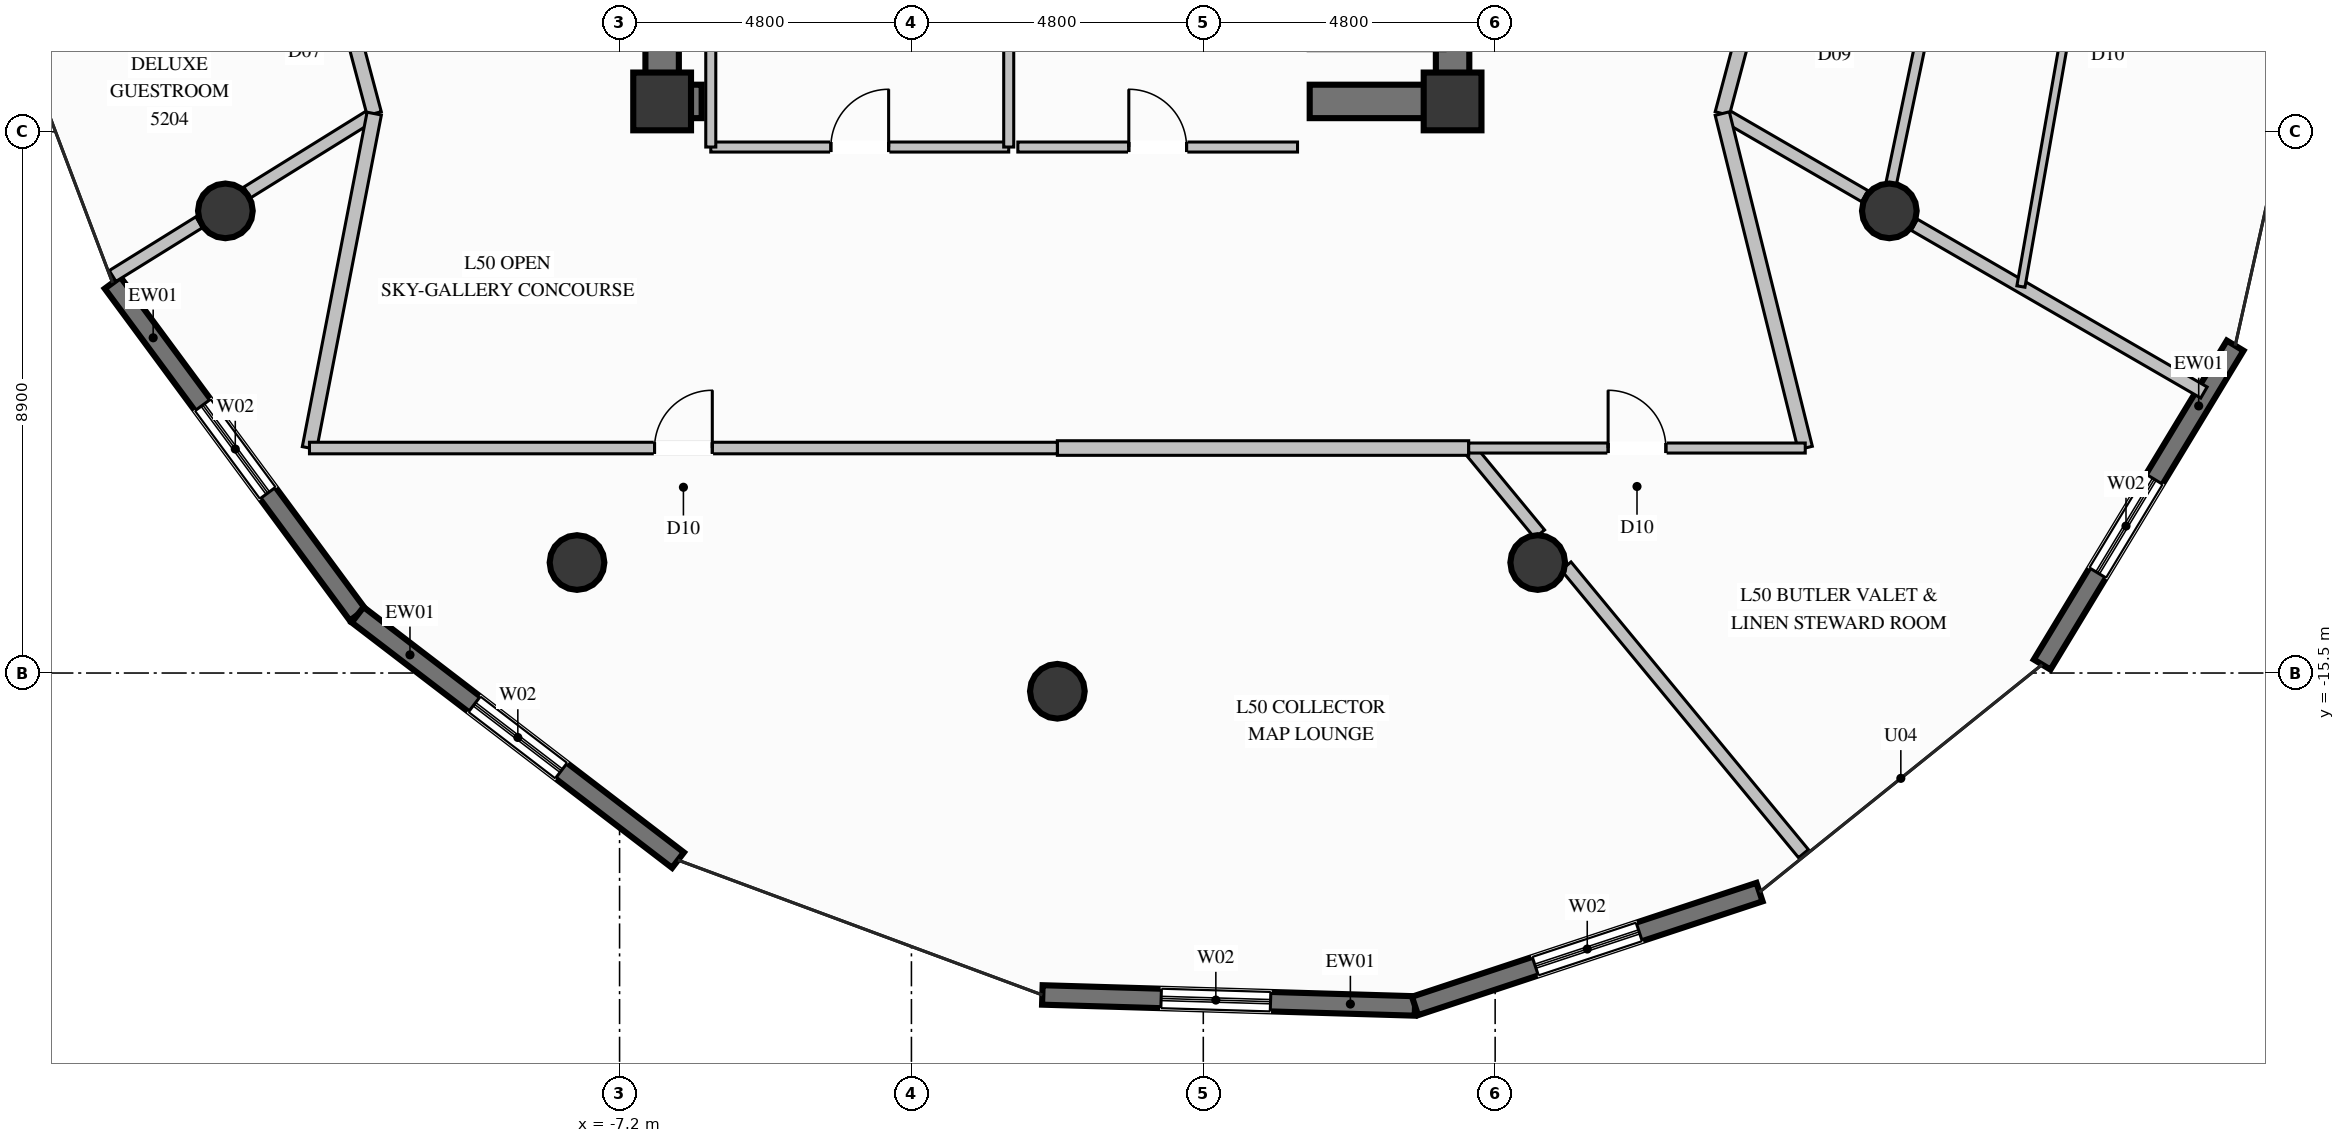
"""IFC4 building model, lengths in metres.
Left out: names, types, materials, properties, quantities, classifications, styles, units other than length and angle.
Written with IfcOpenShell. Run it as: python <this file> out.ifc"""

import sys

from ifc_helpers import new_model, si_unit, direction, frame, frame_2d, origin, origin_2d, place, context, subcontext, project, spatial, rectangle, circle, extrude, element, fill, save


model = new_model("IFC4")
c1 = context("Model", 3, precision=1e-05, world=origin(), true_north=direction((0.0, 1.0)))
c2 = subcontext(c1, "Body", "Model", "MODEL_VIEW")
j1 = project(units=[si_unit("LENGTHUNIT", "METRE"), si_unit("PLANEANGLEUNIT", "RADIAN")], contexts=[c1])
p1 = place(None, origin())
s1 = spatial("IfcSite", under=j1, at=p1, CompositionType="ELEMENT")
p2 = place(p1, origin())
s2 = spatial("IfcBuilding", under=s1, at=p2, CompositionType="ELEMENT")
p3 = place(p2, frame((0.0, 0.0, 194.8)))
s3 = spatial("IfcBuildingStorey", under=s2, at=p3, CompositionType="ELEMENT", Elevation=194.8)
for number, where, z_axis, x_axis in (
    (1, (-6.5, -6.1, 0.0), (0.0, 0.0, 1.0), (1.0, 0.0, 0.0)),
    (2, (6.5, -6.1, 0.0), (0.0, 0.0, 1.0), (1.0, 0.0, 0.0)),
):
    element("IfcColumn", number, at=place(p3, frame(where, z_axis=z_axis, x_axis=x_axis)), inside=s3, PredefinedType="COLUMN", context=c2, shape_type="SweptSolid", body=[
        extrude(rectangle(XDim=0.95, YDim=0.95, at=origin_2d()), origin(), (0.0, 0.0, 1.0), 3.6),
    ])
p4 = place(p3, frame((-6.225, -6.1, 0.0), z_axis=(0.0, 0.0, 1.0), x_axis=(1.0, 0.0, 0.0)))
e3 = element("IfcWall", 3, at=p4, inside=s3, PredefinedType="SHEAR", context=c2, shape_type="SweptSolid", body=[
    extrude(rectangle(XDim=0.375, YDim=0.55, at=frame_2d((0.188, 0.0))), origin(), (0.0, 0.0, 1.0), 3.6),
])
p5 = place(p3, frame((4.15, -6.1, 0.0), z_axis=(0.0, 0.0, 1.0), x_axis=(1.0, 0.0, 0.0)))
e4 = element("IfcWall", 4, at=p5, inside=s3, PredefinedType="SHEAR", context=c2, shape_type="SweptSolid", body=[
    extrude(rectangle(XDim=2.075, YDim=0.55, at=frame_2d((1.038, 0.0))), origin(), (0.0, 0.0, 1.0), 3.6),
])
p6 = place(p3, frame((-6.5, -6.375, 0.0), z_axis=(0.0, 0.0, 1.0), x_axis=(0.0, 1.0, 0.0)))
e5 = element("IfcWall", 5, at=p6, inside=s3, PredefinedType="SHEAR", context=c2, shape_type="SweptSolid", body=[
    extrude(rectangle(XDim=3.025, YDim=0.55, at=frame_2d((1.512, 0.0))), origin(), (0.0, 0.0, 1.0), 3.6),
])
p7 = place(p3, frame((6.5, -6.375, 0.0), z_axis=(0.0, 0.0, 1.0), x_axis=(0.0, 1.0, 0.0)))
e6 = element("IfcWall", 6, at=p7, inside=s3, PredefinedType="SHEAR", context=c2, shape_type="SweptSolid", body=[
    extrude(rectangle(XDim=4.025, YDim=0.55, at=frame_2d((2.012, 0.0))), origin(), (0.0, 0.0, 1.0), 3.6),
])
for number, where, z_axis, x_axis in (
    (7, (-13.683, -7.9, 0.0), (0.0, 0.0, 1.0), (1.0, 0.0, 0.0)),
    (8, (-7.9, -13.683, 0.0), (0.0, 0.0, 1.0), (1.0, 0.0, 0.0)),
    (9, (0.0, -15.8, 0.0), (0.0, 0.0, 1.0), (1.0, 0.0, 0.0)),
    (10, (7.9, -13.683, 0.0), (0.0, 0.0, 1.0), (1.0, 0.0, 0.0)),
    (11, (13.683, -7.9, 0.0), (0.0, 0.0, 1.0), (1.0, 0.0, 0.0)),
):
    element("IfcColumn", number, at=place(p3, frame(where, z_axis=z_axis, x_axis=x_axis)), inside=s3, PredefinedType="COLUMN", context=c2, shape_type="SweptSolid", body=[
        extrude(circle(Radius=0.45, at=origin_2d()), origin(), (0.0, 0.0, 1.0), 3.6),
    ])
p8 = place(p3, frame((19.371, -10.116, 0.0), z_axis=(0.0, 0.0, 1.0), x_axis=(-0.517847159829, -0.855473155077, 0.0)))
e12 = element("IfcWall", 12, at=p8, inside=s3, PredefinedType="SOLIDWALL", context=c2, shape_type="SweptSolid", body=[
    extrude(rectangle(XDim=6.131, YDim=0.32, at=frame_2d((3.066, 0.0))), origin(), (0.0, 0.0, 1.0), 3.36),
])
p9 = place(p8, frame((2.568, 0.0, 0.35)))
e13 = element("IfcOpeningElement", 13, at=p9, cuts=e12, PredefinedType="OPENING", context=c2, shape_type="SweptSolid", body=[
    extrude(rectangle(XDim=1.8, YDim=2.6, at=frame_2d((0.9, 1.3))), frame((0.0, 0.17, 0.0), z_axis=(0.0, -1.0, 0.0), x_axis=(1.0, 0.0, 0.0)), (0.0, 0.0, 1.0), 0.34),
])
p10 = place(p3, frame((-11.508, -14.542, 0.0), z_axis=(0.0, 0.0, 1.0), x_axis=(-0.593926605151, 0.804519227672, 0.0)))
e14 = element("IfcWall", 14, at=p10, inside=s3, PredefinedType="SOLIDWALL", context=c2, shape_type="SweptSolid", body=[
    extrude(rectangle(XDim=6.785, YDim=0.32, at=frame_2d((3.393, 0.0))), origin(), (0.0, 0.0, 1.0), 3.36),
])
p11 = place(p10, frame((2.488, 0.0, 0.35)))
e15 = element("IfcOpeningElement", 15, at=p11, cuts=e14, PredefinedType="OPENING", context=c2, shape_type="SweptSolid", body=[
    extrude(rectangle(XDim=1.8, YDim=2.6, at=frame_2d((0.9, 1.3))), frame((0.0, 0.17, 0.0), z_axis=(0.0, -1.0, 0.0), x_axis=(1.0, 0.0, 0.0)), (0.0, 0.0, 1.0), 0.34),
])
p12 = place(p3, frame((-6.239, -18.577, 0.0), z_axis=(0.0, 0.0, 1.0), x_axis=(-0.793947286628, 0.607986600227, 0.0)))
e16 = element("IfcWall", 16, at=p12, inside=s3, PredefinedType="SOLIDWALL", context=c2, shape_type="SweptSolid", body=[
    extrude(rectangle(XDim=6.636, YDim=0.32, at=frame_2d((3.318, 0.0))), origin(), (0.0, 0.0, 1.0), 3.36),
])
p13 = place(p12, frame((2.418, 0.0, 0.35)))
e17 = element("IfcOpeningElement", 17, at=p13, cuts=e16, PredefinedType="OPENING", context=c2, shape_type="SweptSolid", body=[
    extrude(rectangle(XDim=1.8, YDim=2.6, at=frame_2d((0.9, 1.3))), frame((0.0, 0.17, 0.0), z_axis=(0.0, -1.0, 0.0), x_axis=(1.0, 0.0, 0.0)), (0.0, 0.0, 1.0), 0.34),
])
p14 = place(p3, frame((5.882, -20.975, 0.0), z_axis=(0.0, 0.0, 1.0), x_axis=(-0.999563511361, 0.029542964566, 0.0)))
e18 = element("IfcWall", 18, at=p14, inside=s3, PredefinedType="SOLIDWALL", context=c2, shape_type="SweptSolid", body=[
    extrude(rectangle(XDim=6.132, YDim=0.32, at=frame_2d((3.066, 0.0))), origin(), (0.0, 0.0, 1.0), 3.36),
])
p15 = place(p14, frame((2.377, 0.0, 0.35)))
e19 = element("IfcOpeningElement", 19, at=p15, cuts=e18, PredefinedType="OPENING", context=c2, shape_type="SweptSolid", body=[
    extrude(rectangle(XDim=1.8, YDim=2.6, at=frame_2d((0.9, 1.3))), frame((0.0, 0.17, 0.0), z_axis=(0.0, -1.0, 0.0), x_axis=(1.0, 0.0, 0.0)), (0.0, 0.0, 1.0), 0.34),
])
p16 = place(p3, frame((11.548, -19.103, 0.0), z_axis=(0.0, 0.0, 1.0), x_axis=(-0.949514623973, -0.313722773898, 0.0)))
e20 = element("IfcWall", 20, at=p16, inside=s3, PredefinedType="SOLIDWALL", context=c2, shape_type="SweptSolid", body=[
    extrude(rectangle(XDim=5.967, YDim=0.32, at=frame_2d((2.984, 0.0))), origin(), (0.0, 0.0, 1.0), 3.36),
])
p17 = place(p16, frame((2.084, 0.0, 0.35)))
e21 = element("IfcOpeningElement", 21, at=p17, cuts=e20, PredefinedType="OPENING", context=c2, shape_type="SweptSolid", body=[
    extrude(rectangle(XDim=1.8, YDim=2.6, at=frame_2d((0.9, 1.3))), frame((0.0, 0.17, 0.0), z_axis=(0.0, -1.0, 0.0), x_axis=(1.0, 0.0, 0.0)), (0.0, 0.0, 1.0), 0.34),
])
p18 = place(p3, frame((-5.7, -6.85, 0.0), z_axis=(0.0, 0.0, 1.0), x_axis=(1.0, 0.0, 0.0)))
e22 = element("IfcWall", 22, at=p18, inside=s3, PredefinedType="PARTITIONING", context=c2, shape_type="SweptSolid", body=[
    extrude(rectangle(XDim=4.9, YDim=0.165, at=frame_2d((2.45, 0.0))), origin(), (0.0, 0.0, 1.0), 2.445),
])
p19 = place(p18, frame((1.975, 0.0, 0.0)))
e23 = element("IfcOpeningElement", 23, at=p19, cuts=e22, PredefinedType="OPENING", context=c2, shape_type="SweptSolid", body=[
    extrude(rectangle(XDim=0.95, YDim=2.1, at=frame_2d((0.475, 1.05))), frame((0.0, 0.093, 0.0), z_axis=(0.0, -1.0, 0.0), x_axis=(1.0, 0.0, 0.0)), (0.0, 0.0, 1.0), 0.185),
])
p20 = place(p3, frame((-0.8, -6.85, 0.0), z_axis=(0.0, 0.0, 1.0), x_axis=(0.0, 1.0, 0.0)))
e24 = element("IfcWall", 24, at=p20, inside=s3, PredefinedType="PARTITIONING", context=c2, shape_type="SweptSolid", body=[
    extrude(rectangle(XDim=3.35, YDim=0.165, at=frame_2d((1.675, 0.0))), origin(), (0.0, 0.0, 1.0), 3.36),
])
p21 = place(p3, frame((-5.7, -3.5, 0.0), z_axis=(0.0, 0.0, 1.0), x_axis=(0.0, -1.0, 0.0)))
e25 = element("IfcWall", 25, at=p21, inside=s3, PredefinedType="PARTITIONING", context=c2, shape_type="SweptSolid", body=[
    extrude(rectangle(XDim=3.35, YDim=0.165, at=frame_2d((1.675, 0.0))), origin(), (0.0, 0.0, 1.0), 2.445),
])
p22 = place(p3, frame((-0.65, -6.85, 0.0), z_axis=(0.0, 0.0, 1.0), x_axis=(1.0, 0.0, 0.0)))
e26 = element("IfcWall", 26, at=p22, inside=s3, PredefinedType="PARTITIONING", context=c2, shape_type="SweptSolid", body=[
    extrude(rectangle(XDim=4.6, YDim=0.165, at=frame_2d((2.3, 0.0))), origin(), (0.0, 0.0, 1.0), 2.445),
])
p23 = place(p22, frame((1.825, 0.0, 0.0)))
e27 = element("IfcOpeningElement", 27, at=p23, cuts=e26, PredefinedType="OPENING", context=c2, shape_type="SweptSolid", body=[
    extrude(rectangle(XDim=0.95, YDim=2.1, at=frame_2d((0.475, 1.05))), frame((0.0, 0.093, 0.0), z_axis=(0.0, -1.0, 0.0), x_axis=(1.0, 0.0, 0.0)), (0.0, 0.0, 1.0), 0.185),
])
p24 = place(p3, frame((-11.235, -6.3, 0.0), z_axis=(0.0, 0.0, 1.0), x_axis=(-0.8495787928, -0.527461728302, 0.0)))
e28 = element("IfcWall", 28, at=p24, inside=s3, PredefinedType="PARTITIONING", context=c2, shape_type="SweptSolid", body=[
    extrude(rectangle(XDim=2.459, YDim=0.21, at=frame_2d((1.229, 0.0))), origin(), (0.0, 0.0, 1.0), 2.801),
])
p25 = place(p3, frame((-14.114, -8.087, 0.0), z_axis=(0.0, 0.0, 1.0), x_axis=(-0.849606407473, -0.52741724695, 0.0)))
e29 = element("IfcWall", 29, at=p25, inside=s3, PredefinedType="PARTITIONING", context=c2, shape_type="SweptSolid", body=[
    extrude(rectangle(XDim=1.676, YDim=0.21, at=frame_2d((0.838, 0.0))), origin(), (0.0, 0.0, 1.0), 3.36),
])
p26 = place(p3, frame((10.935, -6.3, 0.0), z_axis=(0.0, 0.0, 1.0), x_axis=(0.865378990195, -0.50111795351, 0.0)))
e30 = element("IfcWall", 30, at=p26, inside=s3, PredefinedType="PARTITIONING", context=c2, shape_type="SweptSolid", body=[
    extrude(rectangle(XDim=2.71, YDim=0.21, at=frame_2d((1.355, 0.0))), origin(), (0.0, 0.0, 1.0), 2.801),
])
p27 = place(p3, frame((14.094, -8.129, 0.0), z_axis=(0.0, 0.0, 1.0), x_axis=(0.865381739925, -0.501113204979, 0.0)))
e31 = element("IfcWall", 31, at=p27, inside=s3, PredefinedType="PARTITIONING", context=c2, shape_type="SweptSolid", body=[
    extrude(rectangle(XDim=5.504, YDim=0.21, at=frame_2d((2.752, 0.0))), origin(), (0.0, 0.0, 1.0), 3.36),
])
p28 = place(p3, frame((-12.23, -2.559, 0.0), z_axis=(0.0, 0.0, 1.0), x_axis=(0.257007037833, -0.966409531464, 0.0)))
e32 = element("IfcWall", 32, at=p28, inside=s3, PredefinedType="PARTITIONING", context=c2, shape_type="SweptSolid", body=[
    extrude(rectangle(XDim=3.871, YDim=0.24, at=frame_2d((1.936, 0.0))), origin(), (0.0, 0.0, 1.0), 3.36),
])
p29 = place(p28, frame((1.436, 0.0, 0.0)))
e33 = element("IfcOpeningElement", 33, at=p29, cuts=e32, PredefinedType="OPENING", context=c2, shape_type="SweptSolid", body=[
    extrude(rectangle(XDim=1.0, YDim=2.2, at=frame_2d((0.5, 1.1))), frame((0.0, 0.13, 0.0), z_axis=(0.0, -1.0, 0.0), x_axis=(1.0, 0.0, 0.0)), (0.0, 0.0, 1.0), 0.26),
])
p30 = place(p3, frame((10.935, -6.3, 0.0), z_axis=(0.0, 0.0, 1.0), x_axis=(0.25685481711, 0.966450000221, 0.0)))
e34 = element("IfcWall", 34, at=p30, inside=s3, PredefinedType="PARTITIONING", context=c2, shape_type="SweptSolid", body=[
    extrude(rectangle(XDim=2.803, YDim=0.24, at=frame_2d((1.401, 0.0))), origin(), (0.0, 0.0, 1.0), 3.36),
])
p31 = place(p3, frame((13.628, -7.86, 0.0), z_axis=(0.0, 0.0, 1.0), x_axis=(0.20438530576, 0.978890518285, 0.0)))
e35 = element("IfcWall", 35, at=p31, inside=s3, PredefinedType="PLUMBINGWALL", context=c2, shape_type="SweptSolid", body=[
    extrude(rectangle(XDim=3.415, YDim=0.175, at=frame_2d((1.708, 0.0))), origin(), (0.0, 0.0, 1.0), 2.929),
])
p32 = place(p3, frame((15.847, -9.144, 0.0), z_axis=(0.0, 0.0, 1.0), x_axis=(0.17298318012, 0.984924778547, 0.0)))
e36 = element("IfcWall", 36, at=p32, inside=s3, PredefinedType="PARTITIONING", context=c2, shape_type="SweptSolid", body=[
    extrude(rectangle(XDim=9.342, YDim=0.135, at=frame_2d((4.671, 0.0))), origin(), (0.0, 0.0, 1.0), 3.36),
])
p33 = place(p32, frame((4.196, 0.0, 0.0)))
e37 = element("IfcOpeningElement", 37, at=p33, cuts=e36, PredefinedType="OPENING", context=c2, shape_type="SweptSolid", body=[
    extrude(rectangle(XDim=0.95, YDim=2.1, at=frame_2d((0.475, 1.05))), frame((0.0, 0.078, 0.0), z_axis=(0.0, -1.0, 0.0), x_axis=(1.0, 0.0, 0.0)), (0.0, 0.0, 1.0), 0.155),
])
p34 = place(p3, frame((6.765, -11.8, 0.0), z_axis=(0.0, 0.0, 1.0), x_axis=(0.636509719066, -0.771268680509, 0.0)))
e38 = element("IfcWall", 38, at=p34, inside=s3, PredefinedType="PARTITIONING", context=c2, shape_type="SweptSolid", body=[
    extrude(rectangle(XDim=1.833, YDim=0.21, at=frame_2d((0.917, 0.0))), origin(), (0.0, 0.0, 1.0), 3.36),
])
p35 = place(p3, frame((8.367, -13.74, 0.0), z_axis=(0.0, 0.0, 1.0), x_axis=(0.636559399156, -0.771227678022, 0.0)))
e39 = element("IfcWall", 39, at=p35, inside=s3, PredefinedType="PARTITIONING", context=c2, shape_type="SweptSolid", body=[
    extrude(rectangle(XDim=6.133, YDim=0.21, at=frame_2d((3.066, 0.0))), origin(), (0.0, 0.0, 1.0), 3.36),
])
p36 = place(p3, frame((-11.235, -6.3, 0.0), z_axis=(0.0, 0.0, 1.0), x_axis=(-0.190095078136, -0.981765685522, 0.0)))
e40 = element("IfcWall", 40, at=p36, inside=s3, PredefinedType="PARTITIONING", context=c2, shape_type="SweptSolid", body=[
    extrude(rectangle(XDim=5.602, YDim=0.24, at=frame_2d((2.801, 0.0))), origin(), (0.0, 0.0, 1.0), 3.36),
])
p37 = place(p3, frame((0.0, -11.8, 0.0), z_axis=(0.0, 0.0, 1.0), x_axis=(1.0, 0.0, 0.0)))
e41 = element("IfcWall", 41, at=p37, inside=s3, PredefinedType="PARTITIONING", context=c2, shape_type="SweptSolid", body=[
    extrude(rectangle(XDim=6.765, YDim=0.24, at=frame_2d((3.382, 0.0))), origin(), (0.0, 0.0, 1.0), 3.36),
])
p38 = place(p3, frame((-12.3, -11.8, 0.0), z_axis=(0.0, 0.0, 1.0), x_axis=(1.0, 0.0, 0.0)))
e42 = element("IfcWall", 42, at=p38, inside=s3, PredefinedType="PARTITIONING", context=c2, shape_type="SweptSolid", body=[
    extrude(rectangle(XDim=12.3, YDim=0.19, at=frame_2d((6.15, 0.0))), origin(), (0.0, 0.0, 1.0), 3.36),
])
p39 = place(p38, frame((5.675, 0.0, 0.0)))
e43 = element("IfcOpeningElement", 43, at=p39, cuts=e42, PredefinedType="OPENING", context=c2, shape_type="SweptSolid", body=[
    extrude(rectangle(XDim=0.95, YDim=2.1, at=frame_2d((0.475, 1.05))), frame((0.0, 0.105, 0.0), z_axis=(0.0, -1.0, 0.0), x_axis=(1.0, 0.0, 0.0)), (0.0, 0.0, 1.0), 0.21),
])
p40 = place(p3, frame((12.3, -11.8, 0.0), z_axis=(0.0, 0.0, 1.0), x_axis=(-0.240872801332, 0.970556692614, 0.0)))
e44 = element("IfcWall", 44, at=p40, inside=s3, PredefinedType="PARTITIONING", context=c2, shape_type="SweptSolid", body=[
    extrude(rectangle(XDim=5.667, YDim=0.24, at=frame_2d((2.833, 0.0))), origin(), (0.0, 0.0, 1.0), 3.36),
])
p41 = place(p3, frame((6.765, -11.8, 0.0), z_axis=(0.0, 0.0, 1.0), x_axis=(1.0, 0.0, 0.0)))
e45 = element("IfcWall", 45, at=p41, inside=s3, PredefinedType="PARTITIONING", context=c2, shape_type="SweptSolid", body=[
    extrude(rectangle(XDim=5.535, YDim=0.165, at=frame_2d((2.768, 0.0))), origin(), (0.0, 0.0, 1.0), 3.36),
])
p42 = place(p41, frame((2.293, 0.0, 0.0)))
e46 = element("IfcOpeningElement", 46, at=p42, cuts=e45, PredefinedType="OPENING", context=c2, shape_type="SweptSolid", body=[
    extrude(rectangle(XDim=0.95, YDim=2.1, at=frame_2d((0.475, 1.05))), frame((0.0, 0.093, 0.0), z_axis=(0.0, -1.0, 0.0), x_axis=(1.0, 0.0, 0.0)), (0.0, 0.0, 1.0), 0.185),
])
p43 = place(p9, origin())
e47 = element("IfcWindow", 47, at=p43, inside=s3, PartitioningType="SINGLE_PANEL", PredefinedType="WINDOW", context=c2, shape_type="SweptSolid", body=[
    extrude(rectangle(XDim=1.8, YDim=2.6, at=frame_2d((0.9, 1.3))), frame((0.0, 0.03, 0.0), z_axis=(0.0, -1.0, 0.0), x_axis=(1.0, 0.0, 0.0)), (0.0, 0.0, 1.0), 0.06),
])
fill(e13, e47)
p44 = place(p11, origin())
e48 = element("IfcWindow", 48, at=p44, inside=s3, PartitioningType="SINGLE_PANEL", PredefinedType="WINDOW", context=c2, shape_type="SweptSolid", body=[
    extrude(rectangle(XDim=1.8, YDim=2.6, at=frame_2d((0.9, 1.3))), frame((0.0, 0.03, 0.0), z_axis=(0.0, -1.0, 0.0), x_axis=(1.0, 0.0, 0.0)), (0.0, 0.0, 1.0), 0.06),
])
fill(e15, e48)
p45 = place(p13, origin())
e49 = element("IfcWindow", 49, at=p45, inside=s3, PartitioningType="SINGLE_PANEL", PredefinedType="WINDOW", context=c2, shape_type="SweptSolid", body=[
    extrude(rectangle(XDim=1.8, YDim=2.6, at=frame_2d((0.9, 1.3))), frame((0.0, 0.03, 0.0), z_axis=(0.0, -1.0, 0.0), x_axis=(1.0, 0.0, 0.0)), (0.0, 0.0, 1.0), 0.06),
])
fill(e17, e49)
p46 = place(p15, origin())
e50 = element("IfcWindow", 50, at=p46, inside=s3, PartitioningType="SINGLE_PANEL", PredefinedType="WINDOW", context=c2, shape_type="SweptSolid", body=[
    extrude(rectangle(XDim=1.8, YDim=2.6, at=frame_2d((0.9, 1.3))), frame((0.0, 0.03, 0.0), z_axis=(0.0, -1.0, 0.0), x_axis=(1.0, 0.0, 0.0)), (0.0, 0.0, 1.0), 0.06),
])
fill(e19, e50)
p47 = place(p17, origin())
e51 = element("IfcWindow", 51, at=p47, inside=s3, PartitioningType="SINGLE_PANEL", PredefinedType="WINDOW", context=c2, shape_type="SweptSolid", body=[
    extrude(rectangle(XDim=1.8, YDim=2.6, at=frame_2d((0.9, 1.3))), frame((0.0, 0.03, 0.0), z_axis=(0.0, -1.0, 0.0), x_axis=(1.0, 0.0, 0.0)), (0.0, 0.0, 1.0), 0.06),
])
fill(e21, e51)
p48 = place(p19, origin())
e52 = element("IfcDoor", 52, at=p48, inside=s3, OperationType="SINGLE_SWING_RIGHT", PredefinedType="DOOR", context=c2, shape_type="SweptSolid", body=[
    extrude(rectangle(XDim=0.95, YDim=2.1, at=frame_2d((0.475, 1.05))), frame((0.0, 0.025, 0.0), z_axis=(0.0, -1.0, 0.0), x_axis=(1.0, 0.0, 0.0)), (0.0, 0.0, 1.0), 0.05),
])
fill(e23, e52)
p49 = place(p23, origin())
e53 = element("IfcDoor", 53, at=p49, inside=s3, OperationType="SINGLE_SWING_LEFT", PredefinedType="DOOR", context=c2, shape_type="SweptSolid", body=[
    extrude(rectangle(XDim=0.95, YDim=2.1, at=frame_2d((0.475, 1.05))), frame((0.0, 0.025, 0.0), z_axis=(0.0, -1.0, 0.0), x_axis=(1.0, 0.0, 0.0)), (0.0, 0.0, 1.0), 0.05),
])
fill(e27, e53)
p50 = place(p39, origin())
e54 = element("IfcDoor", 54, at=p50, inside=s3, OperationType="SINGLE_SWING_RIGHT", PredefinedType="DOOR", context=c2, shape_type="SweptSolid", body=[
    extrude(rectangle(XDim=0.95, YDim=2.1, at=frame_2d((0.475, 1.05))), frame((0.0, 0.025, 0.0), z_axis=(0.0, -1.0, 0.0), x_axis=(1.0, 0.0, 0.0)), (0.0, 0.0, 1.0), 0.05),
])
fill(e43, e54)
p51 = place(p42, origin())
e55 = element("IfcDoor", 55, at=p51, inside=s3, OperationType="SINGLE_SWING_LEFT", PredefinedType="DOOR", context=c2, shape_type="SweptSolid", body=[
    extrude(rectangle(XDim=0.95, YDim=2.1, at=frame_2d((0.475, 1.05))), frame((0.0, 0.025, 0.0), z_axis=(0.0, -1.0, 0.0), x_axis=(1.0, 0.0, 0.0)), (0.0, 0.0, 1.0), 0.05),
])
fill(e46, e55)
save(model, sys.argv[1])
